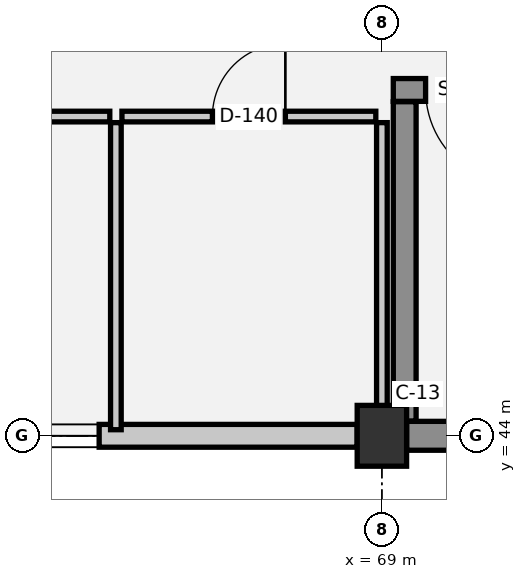
"""IFC4 building model, lengths in metres.
Left out: names, types, materials, properties, quantities, classifications, styles, units other than length and angle.
Written with IfcOpenShell. Run it as: python <this file> out.ifc"""

import sys

from ifc_helpers import new_model, si_unit, direction, frame, frame_2d, origin, origin_2d, place, context, subcontext, project, spatial, rectangle, extrude, element, fill, save


model = new_model("IFC4")
c1 = context("Model", 3, precision=1e-05, world=origin(), true_north=direction((0.0, 1.0)))
c2 = subcontext(c1, "Body", "Model", "MODEL_VIEW")
j1 = project(units=[si_unit("LENGTHUNIT", "METRE"), si_unit("PLANEANGLEUNIT", "RADIAN")], contexts=[c1])
p1 = place(None, origin())
s1 = spatial("IfcSite", under=j1, at=p1, CompositionType="ELEMENT")
p2 = place(p1, origin())
s2 = spatial("IfcBuilding", under=s1, at=p2, CompositionType="ELEMENT")
p3 = place(p2, frame((0.0, 0.0, 14.4)))
s3 = spatial("IfcBuildingStorey", under=s2, at=p3, CompositionType="ELEMENT", Elevation=14.4)
p4 = place(p3, frame((69.0, 44.0, 0.0), z_axis=(0.0, 0.0, 1.0), x_axis=(1.0, 0.0, 0.0)))
e1 = element("IfcColumn", 1, at=p4, inside=s3, PredefinedType="COLUMN", context=c2, shape_type="SweptSolid", body=[
    extrude(rectangle(XDim=0.65, YDim=0.8, at=origin_2d()), origin(), (0.0, 0.0, 1.0), 3.9),
])
p5 = place(p3, frame((76.675, 44.0, 0.0), z_axis=(0.0, 0.0, 1.0), x_axis=(-1.0, 0.0, 0.0)))
e2 = element("IfcWall", 2, at=p5, inside=s3, PredefinedType="STANDARD", context=c2, shape_type="SweptSolid", body=[
    extrude(rectangle(XDim=7.35, YDim=0.38, at=frame_2d((3.675, 0.0))), origin(), (0.0, 0.0, 1.0), 2.61),
])
p6 = place(p3, frame((68.675, 44.0, 0.0), z_axis=(0.0, 0.0, 1.0), x_axis=(-1.0, 0.0, 0.0)))
e3 = element("IfcWall", 3, at=p6, inside=s3, PredefinedType="SOLIDWALL", context=c2, shape_type="SweptSolid", body=[
    extrude(rectangle(XDim=6.35, YDim=0.3, at=frame_2d((3.175, 0.0))), origin(), (0.0, 0.0, 1.0), 2.61),
])
p7 = place(p6, frame((3.395, 0.0, 0.9)))
e4 = element("IfcOpeningElement", 4, at=p7, cuts=e3, PredefinedType="OPENING", context=c2, shape_type="SweptSolid", body=[
    extrude(rectangle(XDim=2.2, YDim=1.0, at=frame_2d((1.1, 0.5))), frame((0.0, 0.16, 0.0), z_axis=(0.0, -1.0, 0.0), x_axis=(1.0, 0.0, 0.0)), (0.0, 0.0, 1.0), 0.32),
])
p8 = place(p3, frame((76.85, 48.55, 0.0), z_axis=(0.0, 0.0, 1.0), x_axis=(-1.0, 0.0, 0.0)))
e5 = element("IfcWall", 5, at=p8, inside=s3, PredefinedType="SHEAR", context=c2, shape_type="SweptSolid", body=[
    extrude(rectangle(XDim=7.7, YDim=0.3, at=frame_2d((3.85, 0.0))), origin(), (0.0, 0.0, 1.0), 3.62),
])
p9 = place(p8, frame((6.025, 0.0, 0.0)))
e6 = element("IfcOpeningElement", 6, at=p9, cuts=e5, PredefinedType="OPENING", context=c2, shape_type="SweptSolid", body=[
    extrude(rectangle(XDim=1.25, YDim=2.15, at=frame_2d((0.625, 1.075))), frame((0.0, 0.16, 0.0), z_axis=(0.0, -1.0, 0.0), x_axis=(1.0, 0.0, 0.0)), (0.0, 0.0, 1.0), 0.32),
])
p10 = place(p3, frame((69.3, 48.395, 0.0), z_axis=(0.0, 0.0, 1.0), x_axis=(0.0, -1.0, 0.0)))
e7 = element("IfcWall", 7, at=p10, inside=s3, PredefinedType="SHEAR", context=c2, shape_type="SweptSolid", body=[
    extrude(rectangle(XDim=4.2, YDim=0.3, at=frame_2d((2.1, 0.0))), origin(), (0.0, 0.0, 1.0), 3.62),
])
p11 = place(p3, frame((62.08, 48.2, 0.0), z_axis=(0.0, 0.0, 1.0), x_axis=(1.0, 0.0, 0.0)))
e8 = element("IfcWall", 8, at=p11, inside=s3, PredefinedType="PLUMBINGWALL", context=c2, shape_type="SweptSolid", body=[
    extrude(rectangle(XDim=3.34, YDim=0.14, at=frame_2d((1.67, 0.0))), origin(), (0.0, 0.0, 1.0), 3.54),
])
p12 = place(p11, frame((1.21, 0.0, 0.0)))
e9 = element("IfcOpeningElement", 9, at=p12, cuts=e8, PredefinedType="OPENING", context=c2, shape_type="SweptSolid", body=[
    extrude(rectangle(XDim=0.92, YDim=2.1, at=frame_2d((0.46, 1.05))), frame((0.0, 0.08, 0.0), z_axis=(0.0, -1.0, 0.0), x_axis=(1.0, 0.0, 0.0)), (0.0, 0.0, 1.0), 0.16),
])
p13 = place(p3, frame((65.58, 48.2, 0.0), z_axis=(0.0, 0.0, 1.0), x_axis=(1.0, 0.0, 0.0)))
e10 = element("IfcWall", 10, at=p13, inside=s3, PredefinedType="PLUMBINGWALL", context=c2, shape_type="SweptSolid", body=[
    extrude(rectangle(XDim=3.34, YDim=0.14, at=frame_2d((1.67, 0.0))), origin(), (0.0, 0.0, 1.0), 3.54),
])
p14 = place(p13, frame((1.19, 0.0, 0.0)))
e11 = element("IfcOpeningElement", 11, at=p14, cuts=e10, PredefinedType="OPENING", context=c2, shape_type="SweptSolid", body=[
    extrude(rectangle(XDim=0.96, YDim=2.1, at=frame_2d((0.48, 1.05))), frame((0.0, 0.08, 0.0), z_axis=(0.0, -1.0, 0.0), x_axis=(1.0, 0.0, 0.0)), (0.0, 0.0, 1.0), 0.16),
])
p15 = place(p3, frame((65.5, 44.08, 0.0), z_axis=(0.0, 0.0, 1.0), x_axis=(0.0, 1.0, 0.0)))
e12 = element("IfcWall", 12, at=p15, inside=s3, PredefinedType="PLUMBINGWALL", context=c2, shape_type="SweptSolid", body=[
    extrude(rectangle(XDim=4.04, YDim=0.14, at=frame_2d((2.02, 0.0))), origin(), (0.0, 0.0, 1.0), 3.54),
])
p16 = place(p3, frame((69.0, 44.08, 0.0), z_axis=(0.0, 0.0, 1.0), x_axis=(0.0, 1.0, 0.0)))
e13 = element("IfcWall", 13, at=p16, inside=s3, PredefinedType="PLUMBINGWALL", context=c2, shape_type="SweptSolid", body=[
    extrude(rectangle(XDim=4.04, YDim=0.14, at=frame_2d((2.02, 0.0))), origin(), (0.0, 0.0, 1.0), 2.98),
])
p17 = place(p7, origin())
e14 = element("IfcWindow", 14, at=p17, inside=s3, PartitioningType="SINGLE_PANEL", PredefinedType="WINDOW", context=c2, shape_type="SweptSolid", body=[
    extrude(rectangle(XDim=2.2, YDim=1.0, at=frame_2d((1.1, 0.5))), frame((0.0, 0.03, 0.0), z_axis=(0.0, -1.0, 0.0), x_axis=(1.0, 0.0, 0.0)), (0.0, 0.0, 1.0), 0.06),
])
fill(e4, e14)
p18 = place(p9, origin())
e15 = element("IfcDoor", 15, at=p18, inside=s3, OperationType="SINGLE_SWING_LEFT", PredefinedType="DOOR", context=c2, shape_type="SweptSolid", body=[
    extrude(rectangle(XDim=1.25, YDim=2.15, at=frame_2d((0.625, 1.075))), frame((0.0, 0.025, 0.0), z_axis=(0.0, -1.0, 0.0), x_axis=(1.0, 0.0, 0.0)), (0.0, 0.0, 1.0), 0.05),
])
fill(e6, e15)
p19 = place(p14, origin())
e16 = element("IfcDoor", 16, at=p19, inside=s3, OperationType="SINGLE_SWING_RIGHT", PredefinedType="DOOR", context=c2, shape_type="SweptSolid", body=[
    extrude(rectangle(XDim=0.96, YDim=2.1, at=frame_2d((0.48, 1.05))), frame((0.0, 0.025, 0.0), z_axis=(0.0, -1.0, 0.0), x_axis=(1.0, 0.0, 0.0)), (0.0, 0.0, 1.0), 0.05),
])
fill(e11, e16)
save(model, sys.argv[1])
